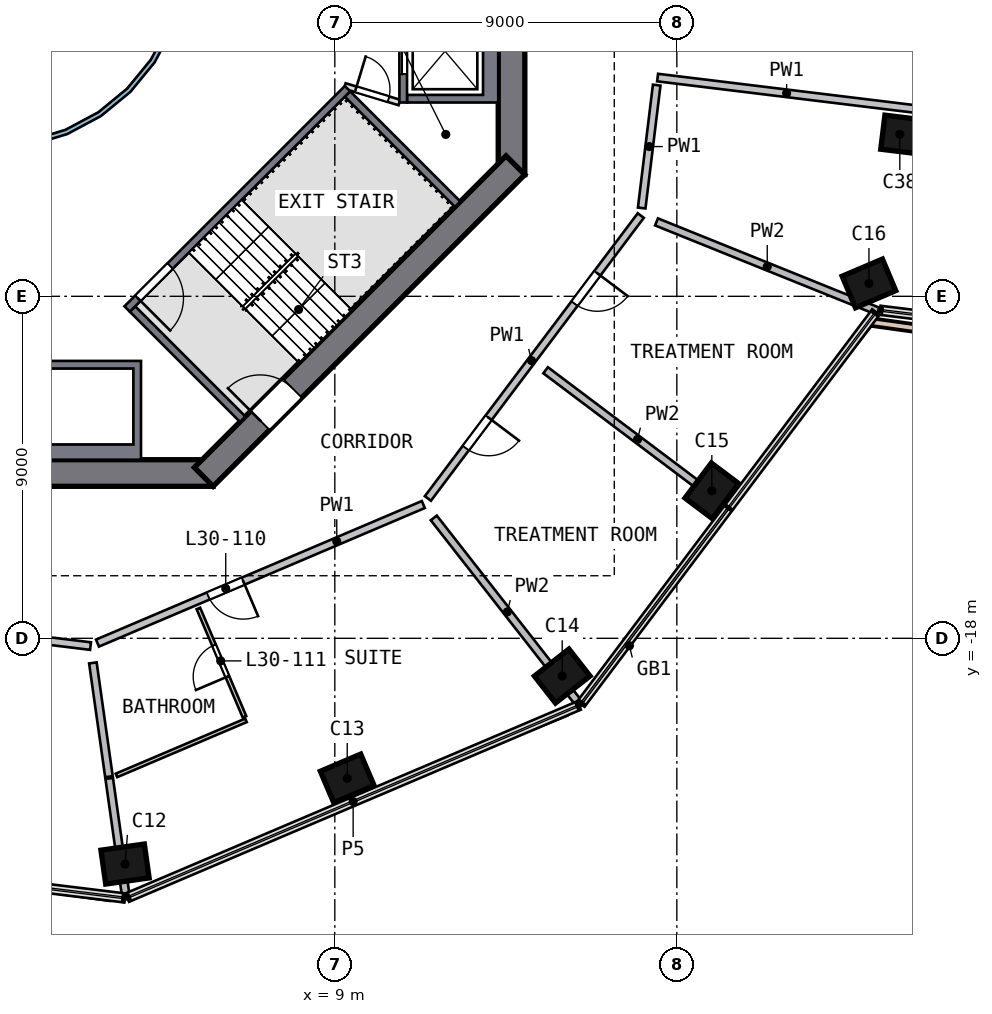
"""IFC4 building model, lengths in metres.
Left out: names, types, materials, properties, quantities, classifications, styles, units other than length and angle.
Written with IfcOpenShell. Run it as: python <this file> out.ifc"""

import sys

from ifc_helpers import new_model, si_unit, direction, frame, frame_2d, origin, origin_2d, place, context, subcontext, project, spatial, polyline, rectangle, outline, extrude, element, fill, save


model = new_model("IFC4")
c1 = context("Model", 3, precision=1e-05, world=origin(), true_north=direction((0.0, 1.0)))
c2 = subcontext(c1, "Body", "Model", "MODEL_VIEW")
j1 = project(units=[si_unit("LENGTHUNIT", "METRE"), si_unit("PLANEANGLEUNIT", "RADIAN")], contexts=[c1])
p1 = place(None, origin())
s1 = spatial("IfcSite", under=j1, at=p1, CompositionType="ELEMENT")
p2 = place(p1, origin())
s2 = spatial("IfcBuilding", under=s1, at=p2, CompositionType="ELEMENT")
p3 = place(p2, frame((0.0, 0.0, 128.0)))
s3 = spatial("IfcBuildingStorey", under=s2, at=p3, CompositionType="ELEMENT", Elevation=128.0)
p4 = place(p3, frame((3.384, -23.955, 0.0), z_axis=(0.079904472, 0.011985671, 0.996730465), x_axis=(-0.986915031, -0.139537813, 0.080795543)))
e1 = element("IfcColumn", 1, at=p4, inside=s3, PredefinedType="COLUMN", context=c2, shape_type="SweptSolid", body=[
    extrude(rectangle(XDim=1.15, YDim=0.9, at=origin_2d()), origin(), (0.0, 0.0, 1.0), 4.705),
])
p5 = place(p3, frame((9.24, -21.725, 0.0), z_axis=(0.07228864, 0.031447894, 0.996887849), x_axis=(0.91745261, 0.389957088, -0.078830061)))
e2 = element("IfcColumn", 2, at=p5, inside=s3, PredefinedType="COLUMN", context=c2, shape_type="SweptSolid", body=[
    extrude(rectangle(XDim=1.15, YDim=0.9, at=origin_2d()), origin(), (0.0, 0.0, 1.0), 4.705),
])
p6 = place(p3, frame((14.908, -19.054, 0.0), z_axis=(0.063248898, 0.050329312, 0.996727915), x_axis=(-0.785140179, -0.614021089, 0.080826983)))
e3 = element("IfcColumn", 3, at=p6, inside=s3, PredefinedType="COLUMN", context=c2, shape_type="SweptSolid", body=[
    extrude(rectangle(XDim=1.15, YDim=0.9, at=origin_2d()), origin(), (0.0, 0.0, 1.0), 4.705),
])
p7 = place(p3, frame((18.865, -14.195, 0.0), z_axis=(0.046860412, 0.063414643, 0.996886495), x_axis=(0.599185859, 0.796717911, -0.078847169)))
e4 = element("IfcColumn", 4, at=p7, inside=s3, PredefinedType="COLUMN", context=c2, shape_type="SweptSolid", body=[
    extrude(rectangle(XDim=1.15, YDim=0.9, at=origin_2d()), origin(), (0.0, 0.0, 1.0), 4.705),
])
p8 = place(p3, frame((23.021, -8.754, 0.0), z_axis=(0.028585742, 0.077145188, 0.996609992), x_axis=(-0.92002921, -0.387768848, 0.056405433)))
e5 = element("IfcColumn", 5, at=p8, inside=s3, PredefinedType="COLUMN", context=c2, shape_type="SweptSolid", body=[
    extrude(rectangle(XDim=1.15, YDim=0.9, at=origin_2d()), origin(), (0.0, 0.0, 1.0), 4.706),
])
p9 = place(p3, frame((23.849, -4.832, 0.0), z_axis=(0.015461489, 0.079746001, 0.996695298), x_axis=(0.992561058, -0.121615922, -0.005666815)))
e6 = element("IfcColumn", 6, at=p9, inside=s3, PredefinedType="COLUMN", context=c2, shape_type="SweptSolid", body=[
    extrude(rectangle(XDim=0.9, YDim=0.9, at=origin_2d()), origin(), (0.0, 0.0, 1.0), 4.706),
])
p10 = place(p3, frame((13.65, -5.799, 0.0), z_axis=(0.0, 0.0, 1.0), x_axis=(0.0, 1.0, 0.0)))
e7 = element("IfcWall", 7, at=p10, inside=s3, PredefinedType="SHEAR", context=c2, shape_type="SweptSolid", body=[
    extrude(rectangle(XDim=11.598, YDim=0.7, at=frame_2d((5.799, 0.0))), origin(), (0.0, 0.0, 1.0), 5.0),
])
p11 = place(p10, frame((4.899, 0.0, 0.0)))
e8 = element("IfcOpeningElement", 8, at=p11, cuts=e7, PredefinedType="OPENING", context=c2, shape_type="SweptSolid", body=[
    extrude(rectangle(XDim=1.8, YDim=2.1, at=frame_2d((0.9, 1.05))), frame((0.0, 0.36, 0.0), z_axis=(0.0, -1.0, 0.0), x_axis=(1.0, 0.0, 0.0)), (0.0, 0.0, 1.0), 0.72),
])
p12 = place(p3, frame((-5.799, -13.65, 0.0), z_axis=(0.0, 0.0, 1.0), x_axis=(1.0, 0.0, 0.0)))
e9 = element("IfcWall", 9, at=p12, inside=s3, PredefinedType="SHEAR", context=c2, shape_type="SweptSolid", body=[
    extrude(rectangle(XDim=11.598, YDim=0.7, at=frame_2d((5.799, 0.0))), origin(), (0.0, 0.0, 1.0), 5.0),
])
p13 = place(p12, frame((4.899, 0.0, 0.0)))
e10 = element("IfcOpeningElement", 10, at=p13, cuts=e9, PredefinedType="OPENING", context=c2, shape_type="SweptSolid", body=[
    extrude(rectangle(XDim=1.8, YDim=2.1, at=frame_2d((0.9, 1.05))), frame((0.0, 0.36, 0.0), z_axis=(0.0, -1.0, 0.0), x_axis=(1.0, 0.0, 0.0)), (0.0, 0.0, 1.0), 0.72),
])
p14 = place(p3, frame((5.552, -13.752, 0.0), z_axis=(0.0, 0.0, 1.0), x_axis=(0.707106781, 0.707106781, 0.0)))
e11 = element("IfcWall", 11, at=p14, inside=s3, PredefinedType="SHEAR", context=c2, shape_type="SweptSolid", body=[
    extrude(rectangle(XDim=11.598, YDim=0.7, at=frame_2d((5.799, 0.0))), origin(), (0.0, 0.0, 1.0), 5.0),
])
p15 = place(p14, frame((2.099, 0.0, 0.0)))
e12 = element("IfcOpeningElement", 12, at=p15, cuts=e11, PredefinedType="OPENING", context=c2, shape_type="SweptSolid", body=[
    extrude(rectangle(XDim=1.2, YDim=2.1, at=frame_2d((0.6, 1.05))), frame((0.0, 0.36, 0.0), z_axis=(0.0, -1.0, 0.0), x_axis=(1.0, 0.0, 0.0)), (0.0, 0.0, 1.0), 0.72),
])
p16 = place(p3, frame((23.096, -9.675, 0.0), z_axis=(0.0, 0.0, 1.0), x_axis=(0.990450404, -0.137869491, 0.0)))
e13 = element("IfcWall", 13, at=p16, inside=s3, PredefinedType="PARAPET", context=c2, shape_type="SweptSolid", body=[
    extrude(rectangle(XDim=1.944, YDim=0.2, at=frame_2d((0.972, 0.0))), origin(), (0.0, 0.0, 1.0), 1.1),
])
p17 = place(p3, origin())
e14 = element("IfcWall", 14, at=p17, inside=s3, PredefinedType="SOLIDWALL", context=c2, shape_type="SweptSolid", body=[
    extrude(outline(polyline([(13.3, -3.9), (10.9, -3.9), (10.9, -3.7), (12.9, -3.7), (12.9, -1.4), (10.9, -1.4), (10.9, -1.2), (13.3, -1.2), (13.3, -3.9)])), origin(), (0.0, 0.0, 1.0), 4.69),
])
p18 = place(p3, frame((10.8, -1.2, 0.0), z_axis=(0.0, 0.0, 1.0), x_axis=(0.0, -1.0, 0.0)))
e15 = element("IfcWall", 15, at=p18, inside=s3, PredefinedType="SOLIDWALL", context=c2, shape_type="SweptSolid", body=[
    extrude(rectangle(XDim=2.7, YDim=0.2, at=frame_2d((1.35, 0.0))), origin(), (0.0, 0.0, 1.0), 4.69),
])
p19 = place(p18, frame((0.75, 0.0, 0.0)))
e16 = element("IfcOpeningElement", 16, at=p19, cuts=e15, PredefinedType="OPENING", context=c2, shape_type="SweptSolid", body=[
    extrude(rectangle(XDim=1.2, YDim=2.1, at=frame_2d((0.6, 1.05))), frame((0.0, 0.11, 0.0), z_axis=(0.0, -1.0, 0.0), x_axis=(1.0, 0.0, 0.0)), (0.0, 0.0, 1.0), 0.22),
])
p20 = place(p3, origin())
e17 = element("IfcWall", 17, at=p20, inside=s3, PredefinedType="SOLIDWALL", context=c2, shape_type="SweptSolid", body=[
    extrude(outline(polyline([(3.9, -10.7), (3.9, -13.3), (1.2, -13.3), (1.2, -10.7), (3.9, -10.7)]), holes=[polyline([(1.4, -12.9), (3.7, -12.9), (3.7, -10.9), (1.4, -10.9), (1.4, -12.9)])]), origin(), (0.0, 0.0, 1.0), 4.69),
])
p21 = place(p3, frame((9.334, -3.535, 0.0), z_axis=(0.0, 0.0, 1.0), x_axis=(-0.707106781, -0.707106781, 0.0)))
e18 = element("IfcWall", 18, at=p21, inside=s3, PredefinedType="SOLIDWALL", context=c2, shape_type="SweptSolid", body=[
    extrude(rectangle(XDim=8.2, YDim=0.2, at=frame_2d((4.1, 0.0))), origin(), (0.0, 0.0, 1.0), 4.69),
])
p22 = place(p21, frame((6.6, 0.0, 0.0)))
e19 = element("IfcOpeningElement", 19, at=p22, cuts=e18, PredefinedType="OPENING", context=c2, shape_type="SweptSolid", body=[
    extrude(rectangle(XDim=1.2, YDim=2.1, at=frame_2d((0.6, 1.05))), frame((0.0, 0.11, 0.0), z_axis=(0.0, -1.0, 0.0), x_axis=(1.0, 0.0, 0.0)), (0.0, 0.0, 1.0), 0.22),
])
for number, where, z_axis, x_axis in (
    (20, (3.677, -9.334, 0.0), (0.0, 0.0, 1.0), (0.707, -0.707, 0.0)),
    (21, (9.334, -3.677, 0.0), (0.0, 0.0, 1.0), (0.707, -0.707, 0.0)),
):
    element("IfcWall", number, at=place(p3, frame(where, z_axis=z_axis, x_axis=x_axis)), inside=s3, PredefinedType="SOLIDWALL", context=c2, shape_type="SweptSolid", body=[
        extrude(rectangle(XDim=4.1, YDim=0.2, at=frame_2d((2.05, 0.0))), origin(), (0.0, 0.0, 1.0), 4.69),
    ])
p23 = place(p3, frame((9.263, -3.465, 0.0), z_axis=(0.0, 0.0, 1.0), x_axis=(0.957084567, -0.289808785, 0.0)))
e22 = element("IfcWall", 22, at=p23, inside=s3, PredefinedType="PARTITIONING", context=c2, shape_type="SweptSolid", body=[
    extrude(rectangle(XDim=1.501, YDim=0.15, at=frame_2d((0.75, 0.0))), origin(), (0.0, 0.0, 1.0), 4.69),
])
p24 = place(p23, frame((0.301, 0.0, 0.0)))
e23 = element("IfcOpeningElement", 23, at=p24, cuts=e22, PredefinedType="OPENING", context=c2, shape_type="SweptSolid", body=[
    extrude(rectangle(XDim=0.9, YDim=2.1, at=frame_2d((0.45, 1.05))), frame((0.0, 0.085, 0.0), z_axis=(0.0, -1.0, 0.0), x_axis=(1.0, 0.0, 0.0)), (0.0, 0.0, 1.0), 0.17),
])
p25 = place(p3, origin())
e24 = element("IfcWall", 24, at=p25, inside=s3, PredefinedType="SOLIDWALL", context=c2, shape_type="SweptSolid", body=[
    extrude(outline(polyline([(5.021, -0.999), (4.73, -1.959), (4.257, -2.844), (3.62, -3.62), (2.844, -4.257), (1.959, -4.73), (0.999, -5.021), (0.0, -5.12), (-0.999, -5.021), (-1.959, -4.73), (-2.844, -4.257), (-3.62, -3.62), (-4.257, -2.844), (-4.73, -1.959), (-5.021, -0.999), (-5.12, 0.0), (-5.021, 0.999), (-4.73, 1.959), (-4.257, 2.844), (-3.62, 3.62), (-2.844, 4.257), (-1.959, 4.73), (-0.999, 5.021), (0.0, 5.12), (0.999, 5.021), (1.959, 4.73), (2.844, 4.257), (3.62, 3.62), (4.257, 2.844), (4.73, 1.959), (5.021, 0.999), (5.12, 0.0), (5.021, -0.999)]), holes=[polyline([(4.904, 0.976), (4.619, 1.913), (4.157, 2.778), (3.535, 3.535), (2.778, 4.157), (1.913, 4.619), (0.976, 4.904), (0.0, 5.0), (-0.976, 4.904), (-1.913, 4.619), (-2.778, 4.157), (-3.535, 3.535), (-4.157, 2.778), (-4.619, 1.913), (-4.904, 0.976), (-5.0, 0.0), (-4.904, -0.976), (-4.619, -1.913), (-4.157, -2.778), (-3.535, -3.535), (-2.778, -4.157), (-1.913, -4.619), (-0.976, -4.904), (0.0, -5.0), (0.976, -4.904), (1.913, -4.619), (2.778, -4.157), (3.535, -3.535), (4.157, -2.778), (4.619, -1.913), (4.904, -0.976), (5.0, 0.0), (4.904, 0.976)])]), origin(), (0.0, 0.0, 1.0), 4.69),
])
p26 = place(p3, frame((2.571, -18.204, 0.0), z_axis=(0.0, 0.0, 1.0), x_axis=(-0.992631355, 0.121173404, 0.0)))
e25 = element("IfcWall", 25, at=p26, inside=s3, PredefinedType="SOLIDWALL", context=c2, shape_type="SweptSolid", body=[
    extrude(rectangle(XDim=9.316, YDim=0.2, at=frame_2d((4.658, 0.0))), origin(), (0.0, 0.0, 1.0), 4.69),
])
p27 = place(p26, frame((5.15, 0.0, 0.0)))
e26 = element("IfcOpeningElement", 26, at=p27, cuts=e25, PredefinedType="OPENING", context=c2, shape_type="SweptSolid", body=[
    extrude(rectangle(XDim=1.0, YDim=2.1, at=frame_2d((0.5, 1.05))), frame((0.0, 0.11, 0.0), z_axis=(0.0, -1.0, 0.0), x_axis=(1.0, 0.0, 0.0)), (0.0, 0.0, 1.0), 0.22),
])
p28 = place(p3, frame((11.329, -14.479, 0.0), z_axis=(0.0, 0.0, 1.0), x_axis=(-0.92022995, -0.391378127, 0.0)))
e27 = element("IfcWall", 27, at=p28, inside=s3, PredefinedType="SOLIDWALL", context=c2, shape_type="SweptSolid", body=[
    extrude(rectangle(XDim=9.316, YDim=0.2, at=frame_2d((4.658, 0.0))), origin(), (0.0, 0.0, 1.0), 4.69),
])
p29 = place(p28, frame((5.15, 0.0, 0.0)))
e28 = element("IfcOpeningElement", 28, at=p29, cuts=e27, PredefinedType="OPENING", context=c2, shape_type="SweptSolid", body=[
    extrude(rectangle(XDim=1.0, YDim=2.1, at=frame_2d((0.5, 1.05))), frame((0.0, 0.11, 0.0), z_axis=(0.0, -1.0, 0.0), x_axis=(1.0, 0.0, 0.0)), (0.0, 0.0, 1.0), 0.22),
])
p30 = place(p3, frame((17.051, -6.875, 0.0), z_axis=(0.0, 0.0, 1.0), x_axis=(-0.601257118, -0.799055616, 0.0)))
e29 = element("IfcWall", 29, at=p30, inside=s3, PredefinedType="SOLIDWALL", context=c2, shape_type="SweptSolid", body=[
    extrude(rectangle(XDim=9.316, YDim=0.2, at=frame_2d((4.658, 0.0))), origin(), (0.0, 0.0, 1.0), 4.69),
])
p31 = place(p30, frame((6.658, 0.0, 0.0)))
e30 = element("IfcOpeningElement", 30, at=p31, cuts=e29, PredefinedType="OPENING", context=c2, shape_type="SweptSolid", body=[
    extrude(rectangle(XDim=1.0, YDim=2.1, at=frame_2d((0.5, 1.05))), frame((0.0, 0.11, 0.0), z_axis=(0.0, -1.0, 0.0), x_axis=(1.0, 0.0, 0.0)), (0.0, 0.0, 1.0), 0.22),
])
p32 = place(p30, frame((1.9, 0.0, 0.0)))
e31 = element("IfcOpeningElement", 31, at=p32, cuts=e29, PredefinedType="OPENING", context=c2, shape_type="SweptSolid", body=[
    extrude(rectangle(XDim=1.0, YDim=2.1, at=frame_2d((0.5, 1.05))), frame((0.0, 0.11, 0.0), z_axis=(0.0, -1.0, 0.0), x_axis=(1.0, 0.0, 0.0)), (0.0, 0.0, 1.0), 0.22),
])
p33 = place(p3, frame((17.075, -6.677, 0.0), z_axis=(0.0, 0.0, 1.0), x_axis=(0.121166027, 0.992632255, 0.0)))
e32 = element("IfcWall", 32, at=p33, inside=s3, PredefinedType="SOLIDWALL", context=c2, shape_type="SweptSolid", body=[
    extrude(rectangle(XDim=3.258, YDim=0.2, at=frame_2d((1.629, 0.0))), origin(), (0.0, 0.0, 1.0), 4.69),
])
p34 = place(p3, frame((31.281, -4.927, 0.0), z_axis=(0.0, 0.0, 1.0), x_axis=(-0.992630982, 0.121176456, 0.0)))
e33 = element("IfcWall", 33, at=p34, inside=s3, PredefinedType="SOLIDWALL", context=c2, shape_type="SweptSolid", body=[
    extrude(rectangle(XDim=13.89, YDim=0.2, at=frame_2d((6.945, 0.0))), origin(), (0.0, 0.0, 1.0), 4.69),
])
p35 = place(p34, frame((5.05, 0.0, 0.0)))
e34 = element("IfcOpeningElement", 34, at=p35, cuts=e33, PredefinedType="OPENING", context=c2, shape_type="SweptSolid", body=[
    extrude(rectangle(XDim=1.8, YDim=2.1, at=frame_2d((0.9, 1.05))), frame((0.0, 0.11, 0.0), z_axis=(0.0, -1.0, 0.0), x_axis=(1.0, 0.0, 0.0)), (0.0, 0.0, 1.0), 0.22),
])
p36 = place(p3, frame((17.761, -1.06, 0.0), z_axis=(0.0, 0.0, 1.0), x_axis=(0.992630933, -0.121176861, 0.0)))
e35 = element("IfcWall", 35, at=p36, inside=s3, PredefinedType="SOLIDWALL", context=c2, shape_type="SweptSolid", body=[
    extrude(rectangle(XDim=13.892, YDim=0.2, at=frame_2d((6.946, 0.0))), origin(), (0.0, 0.0, 1.0), 4.69),
])
p37 = place(p36, frame((7.0, 0.0, 0.0)))
e36 = element("IfcOpeningElement", 36, at=p37, cuts=e35, PredefinedType="OPENING", context=c2, shape_type="SweptSolid", body=[
    extrude(rectangle(XDim=0.9, YDim=2.1, at=frame_2d((0.45, 1.05))), frame((0.0, 0.11, 0.0), z_axis=(0.0, -1.0, 0.0), x_axis=(1.0, 0.0, 0.0)), (0.0, 0.0, 1.0), 0.22),
])
p38 = place(p3, frame((2.634, -18.647, 0.0), z_axis=(0.0, 0.0, 1.0), x_axis=(0.139884315, -0.990167854, 0.0)))
e37 = element("IfcWall", 37, at=p38, inside=s3, PredefinedType="SOLIDWALL", context=c2, shape_type="SweptSolid", body=[
    extrude(rectangle(XDim=3.025, YDim=0.2, at=frame_2d((1.512, 0.0))), origin(), (0.0, 0.0, 1.0), 4.69),
])
p39 = place(p3, frame((3.063, -21.688, 0.0), z_axis=(0.0, 0.0, 1.0), x_axis=(0.139888495, -0.990167263, 0.0)))
e38 = element("IfcWall", 38, at=p39, inside=s3, PredefinedType="SOLIDWALL", context=c2, shape_type="SweptSolid", body=[
    extrude(rectangle(XDim=3.211, YDim=0.2, at=frame_2d((1.605, 0.0))), origin(), (0.0, 0.0, 1.0), 4.69),
])
p40 = place(p3, frame((15.476, -19.779, 0.0), z_axis=(0.0, 0.0, 1.0), x_axis=(-0.61622233, 0.787572245, 0.0)))
e39 = element("IfcWall", 39, at=p40, inside=s3, PredefinedType="SOLIDWALL", context=c2, shape_type="SweptSolid", body=[
    extrude(rectangle(XDim=6.282, YDim=0.2, at=frame_2d((3.141, 0.0))), origin(), (0.0, 0.0, 1.0), 4.69),
])
p41 = place(p3, frame((14.547, -10.946, 0.0), z_axis=(0.0, 0.0, 1.0), x_axis=(0.799059994, -0.601251301, 0.0)))
e40 = element("IfcWall", 40, at=p41, inside=s3, PredefinedType="SOLIDWALL", context=c2, shape_type="SweptSolid", body=[
    extrude(rectangle(XDim=6.053, YDim=0.2, at=frame_2d((3.026, 0.0))), origin(), (0.0, 0.0, 1.0), 4.69),
])
p42 = place(p3, frame((17.466, -7.042, 0.0), z_axis=(0.0, 0.0, 1.0), x_axis=(0.927449299, -0.373948925, 0.0)))
e41 = element("IfcWall", 41, at=p42, inside=s3, PredefinedType="SOLIDWALL", context=c2, shape_type="SweptSolid", body=[
    extrude(rectangle(XDim=6.282, YDim=0.2, at=frame_2d((3.141, 0.0))), origin(), (0.0, 0.0, 1.0), 4.69),
])
p43 = place(p3, frame((6.663, -20.159, 0.0), z_axis=(0.0, 0.0, 1.0), x_axis=(-0.920222329, -0.391396046, 0.0)))
e42 = element("IfcWall", 42, at=p43, inside=s3, PredefinedType="PARTITIONING", context=c2, shape_type="SweptSolid", body=[
    extrude(rectangle(XDim=3.704, YDim=0.1, at=frame_2d((1.852, 0.0))), origin(), (0.0, 0.0, 1.0), 4.69),
])
p44 = place(p3, frame((6.624, -20.067, 0.0), z_axis=(0.0, 0.0, 1.0), x_axis=(-0.391360775, 0.92023733, 0.0)))
e43 = element("IfcWall", 43, at=p44, inside=s3, PredefinedType="PARTITIONING", context=c2, shape_type="SweptSolid", body=[
    extrude(rectangle(XDim=3.1, YDim=0.1, at=frame_2d((1.55, 0.0))), origin(), (0.0, 0.0, 1.0), 4.69),
])
p45 = place(p44, frame((1.15, 0.0, 0.0)))
e44 = element("IfcOpeningElement", 44, at=p45, cuts=e43, PredefinedType="OPENING", context=c2, shape_type="SweptSolid", body=[
    extrude(rectangle(XDim=0.9, YDim=2.1, at=frame_2d((0.45, 1.05))), frame((0.0, 0.06, 0.0), z_axis=(0.0, -1.0, 0.0), x_axis=(1.0, 0.0, 0.0)), (0.0, 0.0, 1.0), 0.12),
])
p46 = place(p19, origin())
e45 = element("IfcDoor", 45, at=p46, inside=s3, OperationType="DOUBLE_DOOR_SLIDING", PredefinedType="DOOR", context=c2, shape_type="SweptSolid", body=[
    extrude(rectangle(XDim=1.2, YDim=2.1, at=frame_2d((0.6, 1.05))), frame((0.0, 0.025, 0.0), z_axis=(0.0, -1.0, 0.0), x_axis=(1.0, 0.0, 0.0)), (0.0, 0.0, 1.0), 0.05),
])
fill(e16, e45)
p47 = place(p22, origin())
e46 = element("IfcDoor", 46, at=p47, inside=s3, OperationType="SINGLE_SWING_RIGHT", PredefinedType="DOOR", context=c2, shape_type="SweptSolid", body=[
    extrude(rectangle(XDim=1.2, YDim=2.1, at=frame_2d((0.6, 1.05))), frame((0.0, 0.025, 0.0), z_axis=(0.0, -1.0, 0.0), x_axis=(1.0, 0.0, 0.0)), (0.0, 0.0, 1.0), 0.05),
])
fill(e19, e46)
p48 = place(p15, origin())
e47 = element("IfcDoor", 47, at=p48, inside=s3, OperationType="SINGLE_SWING_LEFT", PredefinedType="DOOR", context=c2, shape_type="SweptSolid", body=[
    extrude(rectangle(XDim=1.2, YDim=2.1, at=frame_2d((0.6, 1.05))), frame((0.0, 0.025, 0.0), z_axis=(0.0, -1.0, 0.0), x_axis=(1.0, 0.0, 0.0)), (0.0, 0.0, 1.0), 0.05),
])
fill(e12, e47)
p49 = place(p24, origin())
e48 = element("IfcDoor", 48, at=p49, inside=s3, OperationType="SINGLE_SWING_LEFT", PredefinedType="DOOR", context=c2, shape_type="SweptSolid", body=[
    extrude(rectangle(XDim=0.9, YDim=2.1, at=frame_2d((0.45, 1.05))), frame((0.0, 0.025, 0.0), z_axis=(0.0, -1.0, 0.0), x_axis=(1.0, 0.0, 0.0)), (0.0, 0.0, 1.0), 0.05),
])
fill(e23, e48)
p50 = place(p29, origin())
e49 = element("IfcDoor", 49, at=p50, inside=s3, OperationType="SINGLE_SWING_LEFT", PredefinedType="DOOR", context=c2, shape_type="SweptSolid", body=[
    extrude(rectangle(XDim=1.0, YDim=2.1, at=frame_2d((0.5, 1.05))), frame((0.0, 0.025, 0.0), z_axis=(0.0, -1.0, 0.0), x_axis=(1.0, 0.0, 0.0)), (0.0, 0.0, 1.0), 0.05),
])
fill(e28, e49)
p51 = place(p45, origin())
e50 = element("IfcDoor", 50, at=p51, inside=s3, OperationType="SINGLE_SWING_LEFT", PredefinedType="DOOR", context=c2, shape_type="SweptSolid", body=[
    extrude(rectangle(XDim=0.9, YDim=2.1, at=frame_2d((0.45, 1.05))), frame((0.0, 0.025, 0.0), z_axis=(0.0, -1.0, 0.0), x_axis=(1.0, 0.0, 0.0)), (0.0, 0.0, 1.0), 0.05),
])
fill(e44, e50)
p52 = place(p31, origin())
e51 = element("IfcDoor", 51, at=p52, inside=s3, OperationType="SINGLE_SWING_LEFT", PredefinedType="DOOR", context=c2, shape_type="SweptSolid", body=[
    extrude(rectangle(XDim=1.0, YDim=2.1, at=frame_2d((0.5, 1.05))), frame((0.0, 0.025, 0.0), z_axis=(0.0, -1.0, 0.0), x_axis=(1.0, 0.0, 0.0)), (0.0, 0.0, 1.0), 0.05),
])
fill(e30, e51)
p53 = place(p32, origin())
e52 = element("IfcDoor", 52, at=p53, inside=s3, OperationType="SINGLE_SWING_LEFT", PredefinedType="DOOR", context=c2, shape_type="SweptSolid", body=[
    extrude(rectangle(XDim=1.0, YDim=2.1, at=frame_2d((0.5, 1.05))), frame((0.0, 0.025, 0.0), z_axis=(0.0, -1.0, 0.0), x_axis=(1.0, 0.0, 0.0)), (0.0, 0.0, 1.0), 0.05),
])
fill(e31, e52)
save(model, sys.argv[1])
